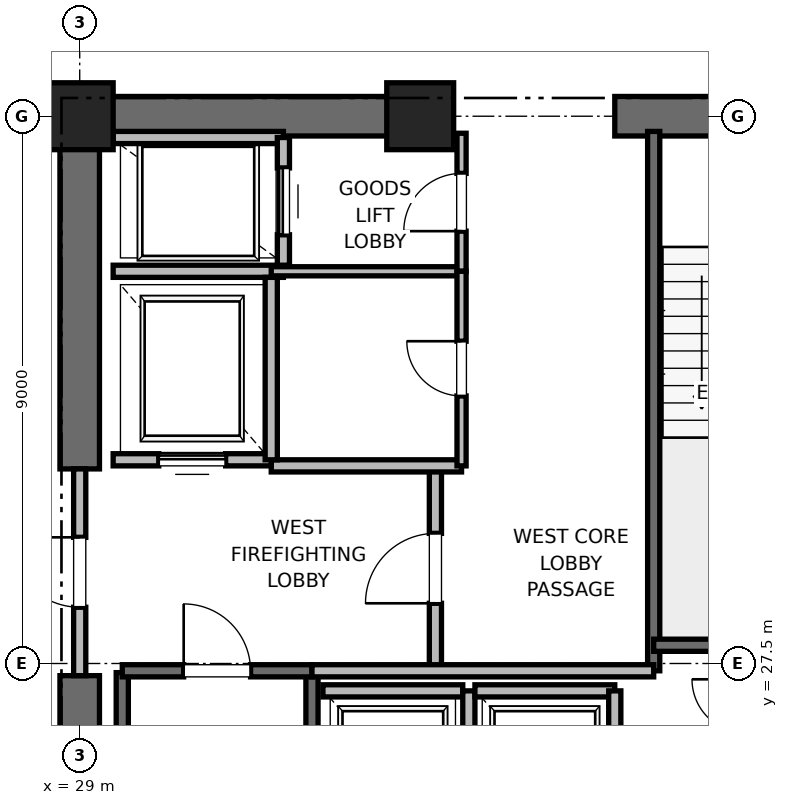
"""IFC4 building model, lengths in metres.
Left out: names, types, materials, properties, quantities, classifications, styles, units other than length and angle.
Written with IfcOpenShell. Run it as: python <this file> out.ifc"""

import sys

from ifc_helpers import new_model, si_unit, direction, frame, frame_2d, origin, origin_2d, place, context, subcontext, project, spatial, rectangle, extrude, element, fill, save


model = new_model("IFC4")
c1 = context("Model", 3, precision=1e-05, world=origin(), true_north=direction((0.0, 1.0)))
c2 = subcontext(c1, "Body", "Model", "MODEL_VIEW")
j1 = project(units=[si_unit("LENGTHUNIT", "METRE"), si_unit("PLANEANGLEUNIT", "RADIAN")], contexts=[c1])
p1 = place(None, origin())
s1 = spatial("IfcSite", under=j1, at=p1, CompositionType="ELEMENT")
p2 = place(p1, origin())
s2 = spatial("IfcBuilding", under=s1, at=p2, CompositionType="ELEMENT")
p3 = place(p2, frame((0.0, 0.0, 67.6)))
s3 = spatial("IfcBuildingStorey", under=s2, at=p3, CompositionType="ELEMENT", Elevation=67.6)
for number, where, z_axis, x_axis in (
    (1, (29.0, 36.5, 0.0), (0.0, 0.0, 1.0), (1.0, 0.0, 0.0)),
    (2, (34.6, 36.5, 0.0), (0.0, 0.0, 1.0), (1.0, 0.0, 0.0)),
):
    element("IfcColumn", number, at=place(p3, frame(where, z_axis=z_axis, x_axis=x_axis)), inside=s3, PredefinedType="PILASTER", context=c2, shape_type="SweptSolid", body=[
        extrude(rectangle(XDim=1.1, YDim=1.1, at=origin_2d()), origin(), (0.0, 0.0, 1.0), 4.0),
    ])
p4 = place(p3, frame((29.0, 36.5, 0.0), z_axis=(0.0, 0.0, 1.0), x_axis=(1.0, 0.0, 0.0)))
e3 = element("IfcWall", 3, at=p4, inside=s3, PredefinedType="SHEAR", context=c2, shape_type="SweptSolid", body=[
    extrude(rectangle(XDim=5.8, YDim=0.65, at=frame_2d((2.9, 0.0))), origin(), (0.0, 0.0, 1.0), 3.76),
])
p5 = place(p3, frame((37.8, 36.5, 0.0), z_axis=(0.0, 0.0, 1.0), x_axis=(1.0, 0.0, 0.0)))
e4 = element("IfcWall", 4, at=p5, inside=s3, PredefinedType="SHEAR", context=c2, shape_type="SweptSolid", body=[
    extrude(rectangle(XDim=4.4, YDim=0.65, at=frame_2d((2.2, 0.0))), origin(), (0.0, 0.0, 1.0), 3.76),
])
p6 = place(p5, frame((1.65, 0.0, 0.0)))
e5 = element("IfcOpeningElement", 5, at=p6, cuts=e4, PredefinedType="OPENING", context=c2, shape_type="SweptSolid", body=[
    extrude(rectangle(XDim=1.1, YDim=2.15, at=frame_2d((0.55, 1.075))), frame((0.0, 0.325, 0.0), z_axis=(0.0, -1.0, 0.0), x_axis=(1.0, 0.0, 0.0)), (0.0, 0.0, 1.0), 0.65),
])
p7 = place(p3, frame((29.0, 18.5, 0.0), z_axis=(0.0, 0.0, 1.0), x_axis=(0.0, 1.0, 0.0)))
e6 = element("IfcWall", 6, at=p7, inside=s3, PredefinedType="SHEAR", context=c2, shape_type="SweptSolid", body=[
    extrude(rectangle(XDim=8.8, YDim=0.65, at=frame_2d((4.4, 0.0))), origin(), (0.0, 0.0, 1.0), 3.76),
])
p8 = place(p3, frame((29.0, 30.7, 0.0), z_axis=(0.0, 0.0, 1.0), x_axis=(0.0, 1.0, 0.0)))
e7 = element("IfcWall", 7, at=p8, inside=s3, PredefinedType="SHEAR", context=c2, shape_type="SweptSolid", body=[
    extrude(rectangle(XDim=5.8, YDim=0.65, at=frame_2d((2.9, 0.0))), origin(), (0.0, 0.0, 1.0), 3.76),
])
p9 = place(p3, frame((29.7, 19.2, 0.0), z_axis=(0.0, 0.0, 1.0), x_axis=(0.0, 1.0, 0.0)))
e8 = element("IfcWall", 8, at=p9, inside=s3, PredefinedType="SOLIDWALL", context=c2, shape_type="SweptSolid", body=[
    extrude(rectangle(XDim=8.15, YDim=0.2, at=frame_2d((4.075, 0.0))), origin(), (0.0, 0.0, 1.0), 3.76),
])
p10 = place(p3, frame((32.82, 18.6, 0.0), z_axis=(0.0, 0.0, 1.0), x_axis=(0.0, 1.0, 0.0)))
e9 = element("IfcWall", 9, at=p10, inside=s3, PredefinedType="SOLIDWALL", context=c2, shape_type="SweptSolid", body=[
    extrude(rectangle(XDim=8.78, YDim=0.2, at=frame_2d((4.39, 0.0))), origin(), (0.0, 0.0, 1.0), 3.76),
])
p11 = place(p3, frame((29.7, 27.38, 0.0), z_axis=(0.0, 0.0, 1.0), x_axis=(1.0, 0.0, 0.0)))
e10 = element("IfcWall", 10, at=p11, inside=s3, PredefinedType="SOLIDWALL", context=c2, shape_type="SweptSolid", body=[
    extrude(rectangle(XDim=3.12, YDim=0.2, at=frame_2d((1.56, 0.0))), origin(), (0.0, 0.0, 1.0), 3.76),
])
p12 = place(p11, frame((1.01, 0.0, 0.0)))
e11 = element("IfcOpeningElement", 11, at=p12, cuts=e10, PredefinedType="OPENING", context=c2, shape_type="SweptSolid", body=[
    extrude(rectangle(XDim=1.1, YDim=2.15, at=frame_2d((0.55, 1.075))), frame((0.0, 0.1, 0.0), z_axis=(0.0, -1.0, 0.0), x_axis=(1.0, 0.0, 0.0)), (0.0, 0.0, 1.0), 0.2),
])
p13 = place(p3, frame((38.44, 27.38, 0.0), z_axis=(0.0, 0.0, 1.0), x_axis=(0.0, 1.0, 0.0)))
e12 = element("IfcWall", 12, at=p13, inside=s3, PredefinedType="SOLIDWALL", context=c2, shape_type="SweptSolid", body=[
    extrude(rectangle(XDim=8.87, YDim=0.2, at=frame_2d((4.435, 0.0))), origin(), (0.0, 0.0, 1.0), 3.76),
])
p14 = place(p3, frame((38.44, 27.8, 0.0), z_axis=(0.0, 0.0, 1.0), x_axis=(1.0, 0.0, 0.0)))
e13 = element("IfcWall", 13, at=p14, inside=s3, PredefinedType="SOLIDWALL", context=c2, shape_type="SweptSolid", body=[
    extrude(rectangle(XDim=3.32, YDim=0.2, at=frame_2d((1.66, 0.0))), origin(), (0.0, 0.0, 1.0), 3.76),
])
p15 = place(p3, frame((34.85, 27.38, 0.0), z_axis=(0.0, 0.0, 1.0), x_axis=(0.0, 1.0, 0.0)))
e14 = element("IfcWall", 14, at=p15, inside=s3, PredefinedType="PARTITIONING", context=c2, shape_type="SweptSolid", body=[
    extrude(rectangle(XDim=3.37, YDim=0.2, at=frame_2d((1.685, 0.0))), origin(), (0.0, 0.0, 1.0), 3.76),
])
p16 = place(p15, frame((1.11, 0.0, 0.0)))
e15 = element("IfcOpeningElement", 15, at=p16, cuts=e14, PredefinedType="OPENING", context=c2, shape_type="SweptSolid", body=[
    extrude(rectangle(XDim=1.15, YDim=2.2, at=frame_2d((0.575, 1.1))), frame((0.0, 0.1, 0.0), z_axis=(0.0, -1.0, 0.0), x_axis=(1.0, 0.0, 0.0)), (0.0, 0.0, 1.0), 0.2),
])
p17 = place(p3, frame((29.0, 27.3, 0.0), z_axis=(0.0, 0.0, 1.0), x_axis=(0.0, 1.0, 0.0)))
e16 = element("IfcWall", 16, at=p17, inside=s3, PredefinedType="PARTITIONING", context=c2, shape_type="SweptSolid", body=[
    extrude(rectangle(XDim=3.4, YDim=0.2, at=frame_2d((1.7, 0.0))), origin(), (0.0, 0.0, 1.0), 2.54),
])
p18 = place(p17, frame((1.125, 0.0, 0.0)))
e17 = element("IfcOpeningElement", 17, at=p18, cuts=e16, PredefinedType="OPENING", context=c2, shape_type="SweptSolid", body=[
    extrude(rectangle(XDim=1.15, YDim=2.2, at=frame_2d((0.575, 1.1))), frame((0.0, 0.1, 0.0), z_axis=(0.0, -1.0, 0.0), x_axis=(1.0, 0.0, 0.0)), (0.0, 0.0, 1.0), 0.2),
])
p19 = place(p3, frame((32.82, 27.38, 0.0), z_axis=(0.0, 0.0, 1.0), x_axis=(1.0, 0.0, 0.0)))
e18 = element("IfcWall", 18, at=p19, inside=s3, PredefinedType="PARTITIONING", context=c2, shape_type="SweptSolid", body=[
    extrude(rectangle(XDim=5.62, YDim=0.2, at=frame_2d((2.81, 0.0))), origin(), (0.0, 0.0, 1.0), 3.76),
])
p20 = place(p3, frame((32.15, 30.75, 0.0), z_axis=(0.0, 0.0, 1.0), x_axis=(1.0, 0.0, 0.0)))
e19 = element("IfcWall", 19, at=p20, inside=s3, PredefinedType="PARTITIONING", context=c2, shape_type="SweptSolid", body=[
    extrude(rectangle(XDim=3.13, YDim=0.2, at=frame_2d((1.565, 0.0))), origin(), (0.0, 0.0, 1.0), 3.76),
])
p21 = place(p3, frame((29.55, 30.85, 0.0), z_axis=(0.0, 0.0, 1.0), x_axis=(1.0, 0.0, 0.0)))
e20 = element("IfcWall", 20, at=p21, inside=s3, PredefinedType="SOLIDWALL", context=c2, shape_type="SweptSolid", body=[
    extrude(rectangle(XDim=2.6, YDim=0.2, at=frame_2d((1.3, 0.0))), origin(), (0.0, 0.0, 1.0), 2.54),
])
p22 = place(p21, frame((0.75, 0.0, 0.0)))
e21 = element("IfcOpeningElement", 21, at=p22, cuts=e20, PredefinedType="OPENING", context=c2, shape_type="SweptSolid", body=[
    extrude(rectangle(XDim=1.1, YDim=2.2, at=frame_2d((0.55, 1.1))), frame((0.0, 0.1, 0.0), z_axis=(0.0, -1.0, 0.0), x_axis=(1.0, 0.0, 0.0)), (0.0, 0.0, 1.0), 0.2),
])
p23 = place(p3, frame((29.55, 33.95, 0.0), z_axis=(0.0, 0.0, 1.0), x_axis=(1.0, 0.0, 0.0)))
e22 = element("IfcWall", 22, at=p23, inside=s3, PredefinedType="SOLIDWALL", context=c2, shape_type="SweptSolid", body=[
    extrude(rectangle(XDim=2.8, YDim=0.2, at=frame_2d((1.4, 0.0))), origin(), (0.0, 0.0, 1.0), 3.76),
])
p24 = place(p3, frame((32.15, 30.85, 0.0), z_axis=(0.0, 0.0, 1.0), x_axis=(0.0, 1.0, 0.0)))
e23 = element("IfcWall", 23, at=p24, inside=s3, PredefinedType="SOLIDWALL", context=c2, shape_type="SweptSolid", body=[
    extrude(rectangle(XDim=3.0, YDim=0.2, at=frame_2d((1.5, 0.0))), origin(), (0.0, 0.0, 1.0), 3.76),
])
p25 = place(p3, frame((32.35, 36.15, 0.0), z_axis=(0.0, 0.0, 1.0), x_axis=(-1.0, 0.0, 0.0)))
e24 = element("IfcWall", 24, at=p25, inside=s3, PredefinedType="SOLIDWALL", context=c2, shape_type="SweptSolid", body=[
    extrude(rectangle(XDim=2.8, YDim=0.2, at=frame_2d((1.4, 0.0))), origin(), (0.0, 0.0, 1.0), 2.889),
])
p26 = place(p3, frame((32.35, 34.05, 0.0), z_axis=(0.0, 0.0, 1.0), x_axis=(0.0, 1.0, 0.0)))
e25 = element("IfcWall", 25, at=p26, inside=s3, PredefinedType="SOLIDWALL", context=c2, shape_type="SweptSolid", body=[
    extrude(rectangle(XDim=2.1, YDim=0.2, at=frame_2d((1.05, 0.0))), origin(), (0.0, 0.0, 1.0), 3.76),
])
p27 = place(p26, frame((0.5, 0.0, 0.0)))
e26 = element("IfcOpeningElement", 26, at=p27, cuts=e25, PredefinedType="OPENING", context=c2, shape_type="SweptSolid", body=[
    extrude(rectangle(XDim=1.1, YDim=2.2, at=frame_2d((0.55, 1.1))), frame((0.0, 0.1, 0.0), z_axis=(0.0, -1.0, 0.0), x_axis=(1.0, 0.0, 0.0)), (0.0, 0.0, 1.0), 0.2),
])
p28 = place(p3, frame((35.3, 27.05, 0.0), z_axis=(0.0, 0.0, 1.0), x_axis=(-1.0, 0.0, 0.0)))
e27 = element("IfcWall", 27, at=p28, inside=s3, PredefinedType="SOLIDWALL", context=c2, shape_type="SweptSolid", body=[
    extrude(rectangle(XDim=2.3, YDim=0.2, at=frame_2d((1.15, 0.0))), origin(), (0.0, 0.0, 1.0), 3.76),
])
p29 = place(p3, frame((35.4, 24.45, 0.0), z_axis=(0.0, 0.0, 1.0), x_axis=(0.0, 1.0, 0.0)))
e28 = element("IfcWall", 28, at=p29, inside=s3, PredefinedType="SOLIDWALL", context=c2, shape_type="SweptSolid", body=[
    extrude(rectangle(XDim=2.6, YDim=0.2, at=frame_2d((1.3, 0.0))), origin(), (0.0, 0.0, 1.0), 3.76),
])
p30 = place(p3, frame((37.8, 27.05, 0.0), z_axis=(0.0, 0.0, 1.0), x_axis=(-1.0, 0.0, 0.0)))
e29 = element("IfcWall", 29, at=p30, inside=s3, PredefinedType="SOLIDWALL", context=c2, shape_type="SweptSolid", body=[
    extrude(rectangle(XDim=2.3, YDim=0.2, at=frame_2d((1.15, 0.0))), origin(), (0.0, 0.0, 1.0), 3.76),
])
p31 = place(p3, frame((37.8, 24.45, 0.0), z_axis=(0.0, 0.0, 1.0), x_axis=(0.0, 1.0, 0.0)))
e30 = element("IfcWall", 30, at=p31, inside=s3, PredefinedType="SOLIDWALL", context=c2, shape_type="SweptSolid", body=[
    extrude(rectangle(XDim=2.6, YDim=0.2, at=frame_2d((1.3, 0.0))), origin(), (0.0, 0.0, 1.0), 3.76),
])
p32 = place(p3, frame((32.15, 33.95, 0.0), z_axis=(0.0, 0.0, 1.0), x_axis=(1.0, 0.0, 0.0)))
e31 = element("IfcWall", 31, at=p32, inside=s3, PredefinedType="PARTITIONING", context=c2, shape_type="SweptSolid", body=[
    extrude(rectangle(XDim=3.13, YDim=0.15, at=frame_2d((1.565, 0.0))), origin(), (0.0, 0.0, 1.0), 2.85),
])
p33 = place(p3, frame((35.28, 33.95, 0.0), z_axis=(0.0, 0.0, 1.0), x_axis=(0.0, 1.0, 0.0)))
e32 = element("IfcWall", 32, at=p33, inside=s3, PredefinedType="PARTITIONING", context=c2, shape_type="SweptSolid", body=[
    extrude(rectangle(XDim=2.27, YDim=0.15, at=frame_2d((1.135, 0.0))), origin(), (0.0, 0.0, 1.0), 2.54),
])
p34 = place(p33, frame((0.66, 0.0, 0.0)))
e33 = element("IfcOpeningElement", 33, at=p34, cuts=e32, PredefinedType="OPENING", context=c2, shape_type="SweptSolid", body=[
    extrude(rectangle(XDim=0.95, YDim=2.15, at=frame_2d((0.475, 1.075))), frame((0.0, 0.075, 0.0), z_axis=(0.0, -1.0, 0.0), x_axis=(1.0, 0.0, 0.0)), (0.0, 0.0, 1.0), 0.15),
])
p35 = place(p3, frame((35.28, 30.75, 0.0), z_axis=(0.0, 0.0, 1.0), x_axis=(0.0, 1.0, 0.0)))
e34 = element("IfcWall", 34, at=p35, inside=s3, PredefinedType="PARTITIONING", context=c2, shape_type="SweptSolid", body=[
    extrude(rectangle(XDim=3.2, YDim=0.15, at=frame_2d((1.6, 0.0))), origin(), (0.0, 0.0, 1.0), 2.85),
])
p36 = place(p35, frame((1.15, 0.0, 0.0)))
e35 = element("IfcOpeningElement", 35, at=p36, cuts=e34, PredefinedType="OPENING", context=c2, shape_type="SweptSolid", body=[
    extrude(rectangle(XDim=0.9, YDim=2.1, at=frame_2d((0.45, 1.05))), frame((0.0, 0.075, 0.0), z_axis=(0.0, -1.0, 0.0), x_axis=(1.0, 0.0, 0.0)), (0.0, 0.0, 1.0), 0.15),
])
p37 = place(p12, origin())
e36 = element("IfcDoor", 36, at=p37, inside=s3, OperationType="SINGLE_SWING_LEFT", PredefinedType="DOOR", context=c2, shape_type="SweptSolid", body=[
    extrude(rectangle(XDim=1.1, YDim=2.15, at=frame_2d((0.55, 1.075))), frame((0.0, 0.025, 0.0), z_axis=(0.0, -1.0, 0.0), x_axis=(1.0, 0.0, 0.0)), (0.0, 0.0, 1.0), 0.05),
])
fill(e11, e36)
p38 = place(p16, origin())
e37 = element("IfcDoor", 37, at=p38, inside=s3, OperationType="SINGLE_SWING_LEFT", PredefinedType="DOOR", context=c2, shape_type="SweptSolid", body=[
    extrude(rectangle(XDim=1.15, YDim=2.2, at=frame_2d((0.575, 1.1))), frame((0.0, 0.025, 0.0), z_axis=(0.0, -1.0, 0.0), x_axis=(1.0, 0.0, 0.0)), (0.0, 0.0, 1.0), 0.05),
])
fill(e15, e37)
p39 = place(p18, origin())
e38 = element("IfcDoor", 38, at=p39, inside=s3, OperationType="SINGLE_SWING_RIGHT", PredefinedType="DOOR", context=c2, shape_type="SweptSolid", body=[
    extrude(rectangle(XDim=1.15, YDim=2.2, at=frame_2d((0.575, 1.1))), frame((0.0, 0.025, 0.0), z_axis=(0.0, -1.0, 0.0), x_axis=(1.0, 0.0, 0.0)), (0.0, 0.0, 1.0), 0.05),
])
fill(e17, e38)
p40 = place(p22, origin())
e39 = element("IfcDoor", 39, at=p40, inside=s3, OperationType="SLIDING_TO_RIGHT", PredefinedType="DOOR", context=c2, shape_type="SweptSolid", body=[
    extrude(rectangle(XDim=1.1, YDim=2.2, at=frame_2d((0.55, 1.1))), frame((0.0, 0.025, 0.0), z_axis=(0.0, -1.0, 0.0), x_axis=(1.0, 0.0, 0.0)), (0.0, 0.0, 1.0), 0.05),
])
fill(e21, e39)
p41 = place(p27, origin())
e40 = element("IfcDoor", 40, at=p41, inside=s3, OperationType="SLIDING_TO_RIGHT", PredefinedType="DOOR", context=c2, shape_type="SweptSolid", body=[
    extrude(rectangle(XDim=1.1, YDim=2.2, at=frame_2d((0.55, 1.1))), frame((0.0, 0.025, 0.0), z_axis=(0.0, -1.0, 0.0), x_axis=(1.0, 0.0, 0.0)), (0.0, 0.0, 1.0), 0.05),
])
fill(e26, e40)
p42 = place(p34, origin())
e41 = element("IfcDoor", 41, at=p42, inside=s3, OperationType="SINGLE_SWING_LEFT", PredefinedType="DOOR", context=c2, shape_type="SweptSolid", body=[
    extrude(rectangle(XDim=0.95, YDim=2.15, at=frame_2d((0.475, 1.075))), frame((0.0, 0.025, 0.0), z_axis=(0.0, -1.0, 0.0), x_axis=(1.0, 0.0, 0.0)), (0.0, 0.0, 1.0), 0.05),
])
fill(e33, e41)
p43 = place(p36, origin())
e42 = element("IfcDoor", 42, at=p43, inside=s3, OperationType="SINGLE_SWING_RIGHT", PredefinedType="DOOR", context=c2, shape_type="SweptSolid", body=[
    extrude(rectangle(XDim=0.9, YDim=2.1, at=frame_2d((0.45, 1.05))), frame((0.0, 0.025, 0.0), z_axis=(0.0, -1.0, 0.0), x_axis=(1.0, 0.0, 0.0)), (0.0, 0.0, 1.0), 0.05),
])
fill(e35, e42)
save(model, sys.argv[1])
